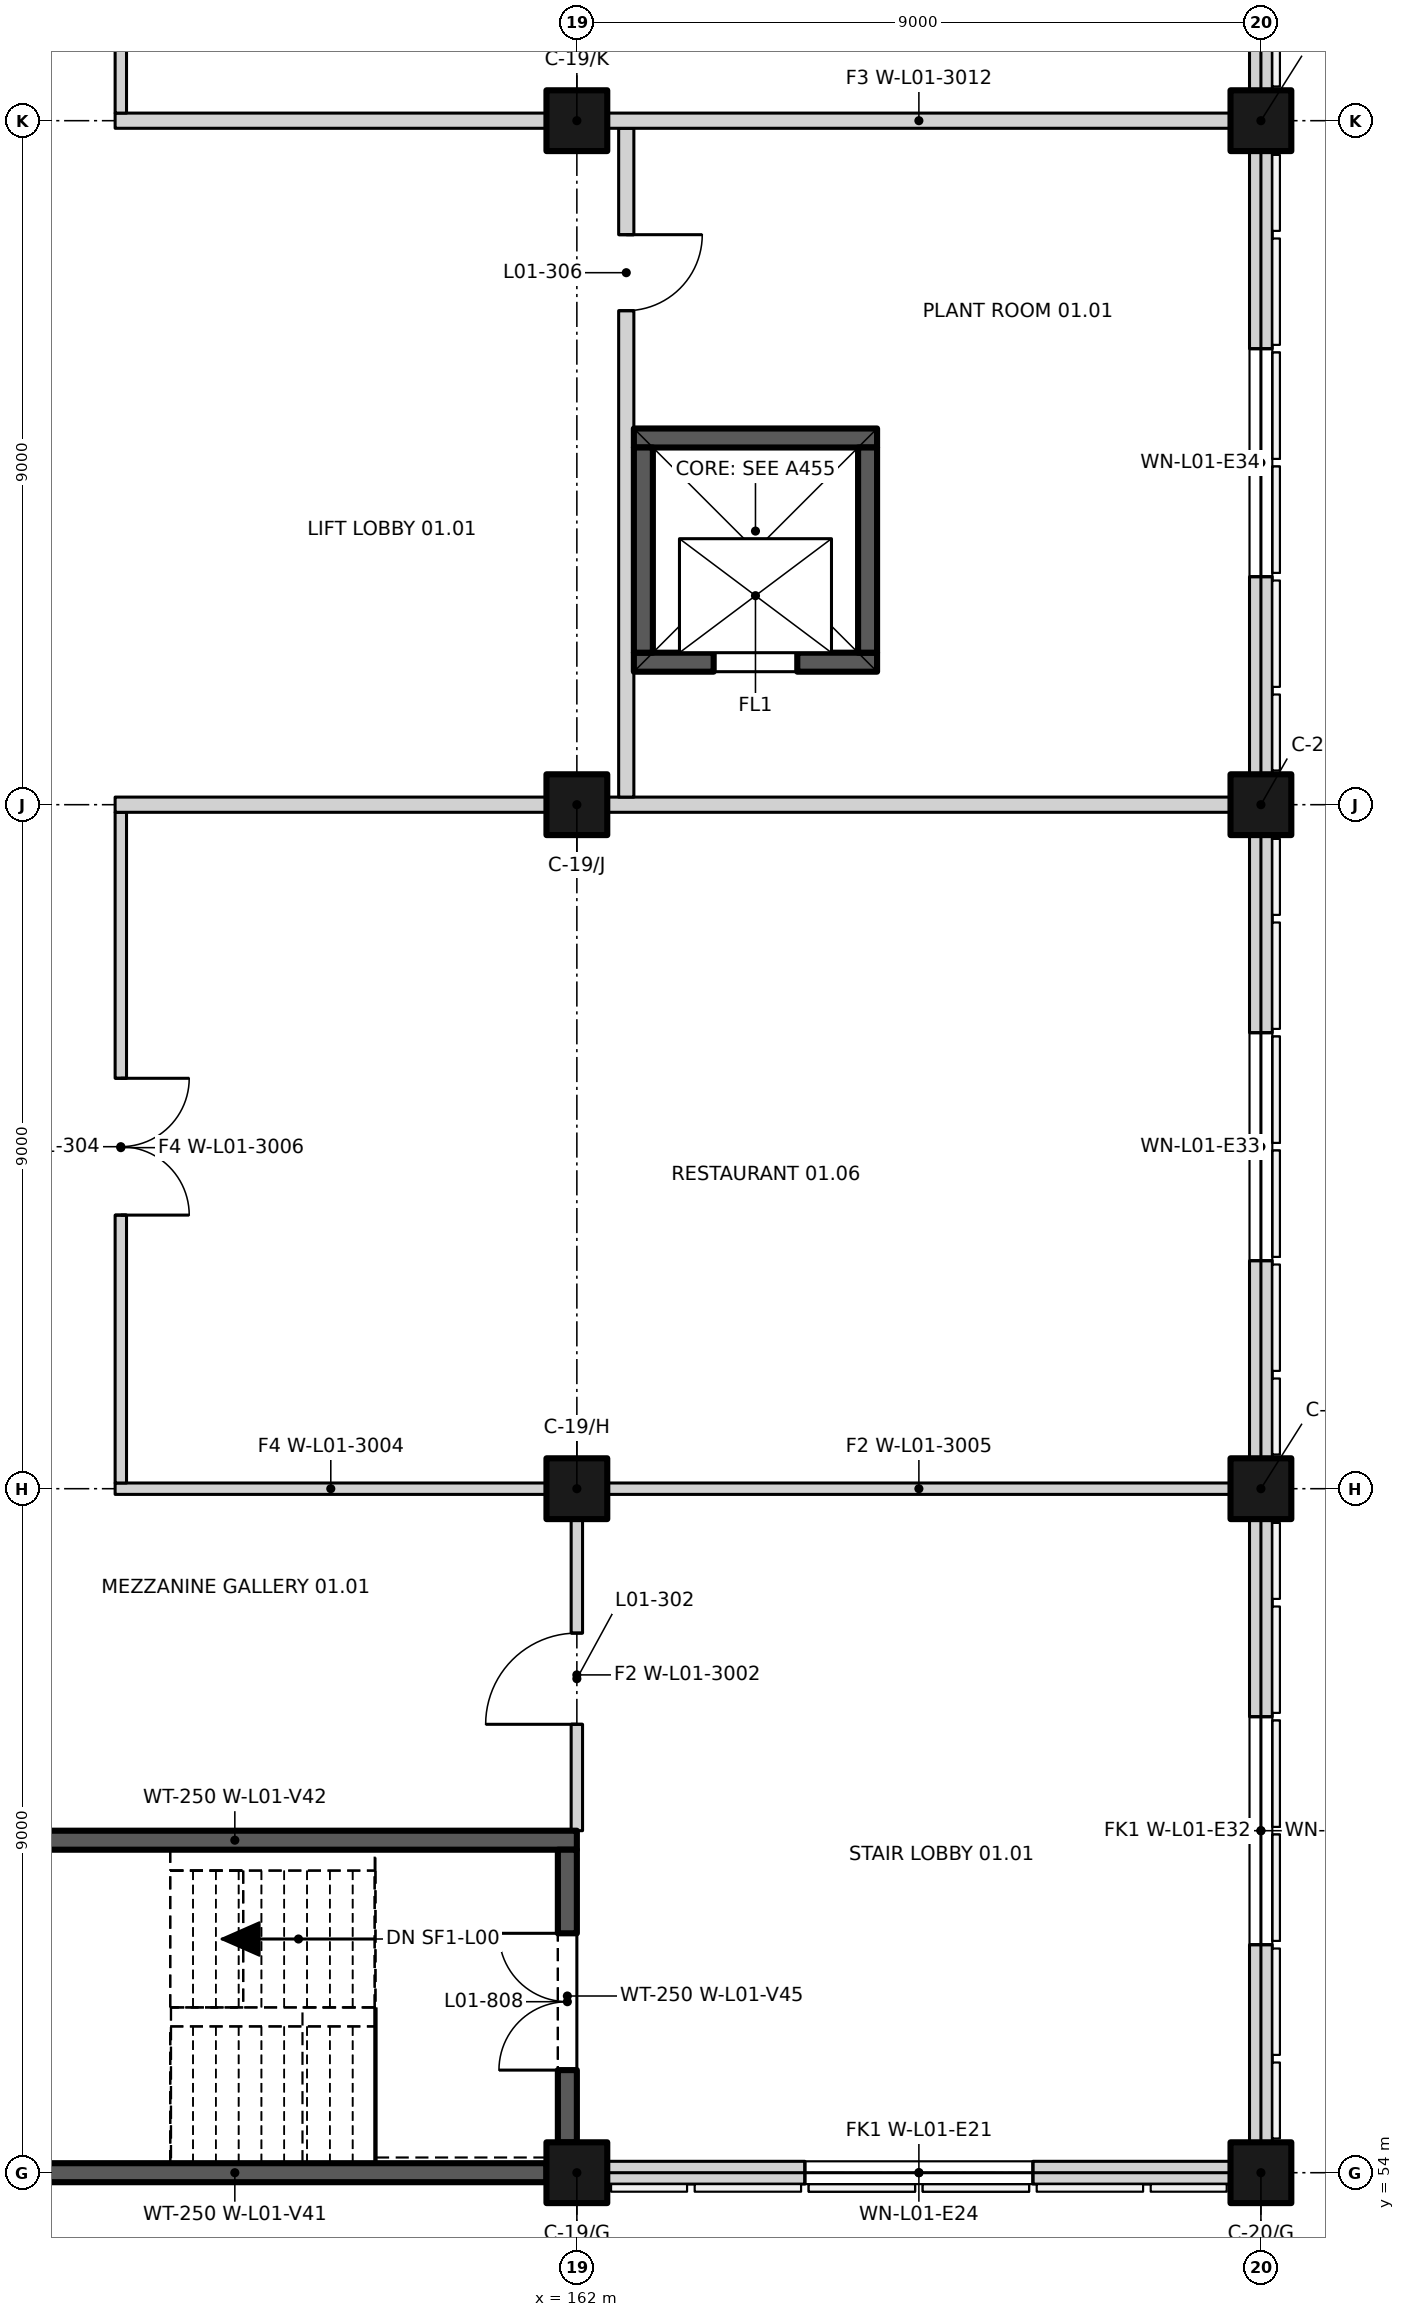
"""IFC4 building model, lengths in metres.
Left out: names, types, materials, properties, quantities, classifications, styles, units other than length and angle.
Written with IfcOpenShell. Run it as: python <this file> out.ifc"""

import sys

from ifc_helpers import new_model, si_unit, direction, frame, frame_2d, origin, origin_2d, place, context, subcontext, project, spatial, rectangle, extrude, element, fill, save


model = new_model("IFC4")
c1 = context("Model", 3, precision=1e-05, world=origin(), true_north=direction((0.0, 1.0)))
c2 = subcontext(c1, "Body", "Model", "MODEL_VIEW")
j1 = project(units=[si_unit("LENGTHUNIT", "METRE"), si_unit("PLANEANGLEUNIT", "RADIAN")], contexts=[c1])
p1 = place(None, origin())
s1 = spatial("IfcSite", under=j1, at=p1, CompositionType="ELEMENT")
p2 = place(p1, origin())
s2 = spatial("IfcBuilding", under=s1, at=p2, CompositionType="ELEMENT")
p3 = place(p2, frame((0.0, 0.0, 6.0)))
s3 = spatial("IfcBuildingStorey", under=s2, at=p3, CompositionType="ELEMENT", Elevation=6.0)
for number, where, z_axis, x_axis in (
    (1, (162.0, 54.0, 0.0), (0.0, 0.0, 1.0), (1.0, 0.0, 0.0)),
    (2, (171.0, 54.0, 0.0), (0.0, 0.0, 1.0), (1.0, 0.0, 0.0)),
    (3, (162.0, 63.0, 0.0), (0.0, 0.0, 1.0), (1.0, 0.0, 0.0)),
    (4, (171.0, 63.0, 0.0), (0.0, 0.0, 1.0), (1.0, 0.0, 0.0)),
    (5, (162.0, 72.0, 0.0), (0.0, 0.0, 1.0), (1.0, 0.0, 0.0)),
    (6, (171.0, 72.0, 0.0), (0.0, 0.0, 1.0), (1.0, 0.0, 0.0)),
    (7, (162.0, 81.0, 0.0), (0.0, 0.0, 1.0), (1.0, 0.0, 0.0)),
    (8, (171.0, 81.0, 0.0), (0.0, 0.0, 1.0), (1.0, 0.0, 0.0)),
):
    element("IfcColumn", number, at=place(p3, frame(where, z_axis=z_axis, x_axis=x_axis)), inside=s3, PredefinedType="COLUMN", context=c2, shape_type="SweptSolid", body=[
        extrude(rectangle(XDim=0.8, YDim=0.8, at=origin_2d()), origin(), (0.0, 0.0, 1.0), 4.5),
    ])
p4 = place(p3, frame((153.4, 54.0, 0.0), z_axis=(0.0, 0.0, 1.0), x_axis=(1.0, 0.0, 0.0)))
e9 = element("IfcWall", 9, at=p4, inside=s3, PredefinedType="SHEAR", context=c2, shape_type="SweptSolid", body=[
    extrude(rectangle(XDim=8.2, YDim=0.25, at=frame_2d((4.1, 0.0))), origin(), (0.0, 0.0, 1.0), 3.65),
])
p5 = place(p3, frame((153.0, 58.375, 0.0), z_axis=(0.0, 0.0, 1.0), x_axis=(1.0, 0.0, 0.0)))
e10 = element("IfcWall", 10, at=p5, inside=s3, PredefinedType="SHEAR", context=c2, shape_type="SweptSolid", body=[
    extrude(rectangle(XDim=9.0, YDim=0.25, at=frame_2d((4.5, 0.0))), origin(), (0.0, 0.0, 1.0), 4.2),
])
p6 = place(p3, frame((161.875, 54.4, 0.0), z_axis=(0.0, 0.0, 1.0), x_axis=(0.0, 1.0, 0.0)))
e11 = element("IfcWall", 11, at=p6, inside=s3, PredefinedType="SHEAR", context=c2, shape_type="SweptSolid", body=[
    extrude(rectangle(XDim=3.85, YDim=0.25, at=frame_2d((1.925, 0.0))), origin(), (0.0, 0.0, 1.0), 4.2),
])
p7 = place(p6, frame((0.95, 0.0, 0.0)))
e12 = element("IfcOpeningElement", 12, at=p7, cuts=e11, PredefinedType="OPENING", context=c2, shape_type="SweptSolid", body=[
    extrude(rectangle(XDim=1.8, YDim=2.1, at=frame_2d((0.9, 1.05))), frame((0.0, 0.135, 0.0), z_axis=(0.0, -1.0, 0.0), x_axis=(1.0, 0.0, 0.0)), (0.0, 0.0, 1.0), 0.27),
])
p8 = place(p3, frame((162.75, 73.875, 0.0), z_axis=(0.0, 0.0, 1.0), x_axis=(1.0, 0.0, 0.0)))
e13 = element("IfcWall", 13, at=p8, inside=s3, PredefinedType="SHEAR", context=c2, shape_type="SweptSolid", body=[
    extrude(rectangle(XDim=3.2, YDim=0.25, at=frame_2d((1.6, 0.0))), origin(), (0.0, 0.0, 1.0), 4.5),
])
p9 = place(p8, frame((1.05, 0.0, 0.0)))
e14 = element("IfcOpeningElement", 14, at=p9, cuts=e13, PredefinedType="OPENING", context=c2, shape_type="SweptSolid", body=[
    extrude(rectangle(XDim=1.1, YDim=2.1, at=frame_2d((0.55, 1.05))), frame((0.0, 0.135, 0.0), z_axis=(0.0, -1.0, 0.0), x_axis=(1.0, 0.0, 0.0)), (0.0, 0.0, 1.0), 0.27),
])
p10 = place(p3, frame((162.75, 76.825, 0.0), z_axis=(0.0, 0.0, 1.0), x_axis=(1.0, 0.0, 0.0)))
e15 = element("IfcWall", 15, at=p10, inside=s3, PredefinedType="SHEAR", context=c2, shape_type="SweptSolid", body=[
    extrude(rectangle(XDim=3.2, YDim=0.25, at=frame_2d((1.6, 0.0))), origin(), (0.0, 0.0, 1.0), 4.5),
])
for number, where, z_axis, x_axis in (
    (16, (162.875, 74.0, 0.0), (0.0, 0.0, 1.0), (0.0, 1.0, 0.0)),
    (17, (165.825, 74.0, 0.0), (0.0, 0.0, 1.0), (0.0, 1.0, 0.0)),
):
    element("IfcWall", number, at=place(p3, frame(where, z_axis=z_axis, x_axis=x_axis)), inside=s3, PredefinedType="SHEAR", context=c2, shape_type="SweptSolid", body=[
        extrude(rectangle(XDim=2.7, YDim=0.25, at=frame_2d((1.35, 0.0))), origin(), (0.0, 0.0, 1.0), 4.5),
    ])
p11 = place(p3, frame((170.6, 54.0, 0.0), z_axis=(0.0, 0.0, 1.0), x_axis=(-1.0, 0.0, 0.0)))
e18 = element("IfcWall", 18, at=p11, inside=s3, PredefinedType="SOLIDWALL", context=c2, shape_type="SweptSolid", body=[
    extrude(rectangle(XDim=8.2, YDim=0.3, at=frame_2d((4.1, 0.0))), origin(), (0.0, 0.0, 1.0), 3.65),
])
p12 = place(p11, frame((2.6, 0.0, 0.9)))
e19 = element("IfcOpeningElement", 19, at=p12, cuts=e18, PredefinedType="OPENING", context=c2, shape_type="SweptSolid", body=[
    extrude(rectangle(XDim=3.0, YDim=2.1, at=frame_2d((1.5, 1.05))), frame((0.0, 0.16, 0.0), z_axis=(0.0, -1.0, 0.0), x_axis=(1.0, 0.0, 0.0)), (0.0, 0.0, 1.0), 0.32),
])
p13 = place(p3, frame((171.0, 62.6, 0.0), z_axis=(0.0, 0.0, 1.0), x_axis=(0.0, -1.0, 0.0)))
e20 = element("IfcWall", 20, at=p13, inside=s3, PredefinedType="SOLIDWALL", context=c2, shape_type="SweptSolid", body=[
    extrude(rectangle(XDim=8.2, YDim=0.3, at=frame_2d((4.1, 0.0))), origin(), (0.0, 0.0, 1.0), 3.65),
])
p14 = place(p13, frame((2.6, 0.0, 0.9)))
e21 = element("IfcOpeningElement", 21, at=p14, cuts=e20, PredefinedType="OPENING", context=c2, shape_type="SweptSolid", body=[
    extrude(rectangle(XDim=3.0, YDim=2.1, at=frame_2d((1.5, 1.05))), frame((0.0, 0.16, 0.0), z_axis=(0.0, -1.0, 0.0), x_axis=(1.0, 0.0, 0.0)), (0.0, 0.0, 1.0), 0.32),
])
p15 = place(p3, frame((171.0, 71.6, 0.0), z_axis=(0.0, 0.0, 1.0), x_axis=(0.0, -1.0, 0.0)))
e22 = element("IfcWall", 22, at=p15, inside=s3, PredefinedType="SOLIDWALL", context=c2, shape_type="SweptSolid", body=[
    extrude(rectangle(XDim=8.2, YDim=0.3, at=frame_2d((4.1, 0.0))), origin(), (0.0, 0.0, 1.0), 3.65),
])
p16 = place(p15, frame((2.6, 0.0, 0.9)))
e23 = element("IfcOpeningElement", 23, at=p16, cuts=e22, PredefinedType="OPENING", context=c2, shape_type="SweptSolid", body=[
    extrude(rectangle(XDim=3.0, YDim=2.1, at=frame_2d((1.5, 1.05))), frame((0.0, 0.16, 0.0), z_axis=(0.0, -1.0, 0.0), x_axis=(1.0, 0.0, 0.0)), (0.0, 0.0, 1.0), 0.32),
])
p17 = place(p3, frame((171.0, 80.6, 0.0), z_axis=(0.0, 0.0, 1.0), x_axis=(0.0, -1.0, 0.0)))
e24 = element("IfcWall", 24, at=p17, inside=s3, PredefinedType="SOLIDWALL", context=c2, shape_type="SweptSolid", body=[
    extrude(rectangle(XDim=8.2, YDim=0.3, at=frame_2d((4.1, 0.0))), origin(), (0.0, 0.0, 1.0), 3.65),
])
p18 = place(p17, frame((2.6, 0.0, 0.9)))
e25 = element("IfcOpeningElement", 25, at=p18, cuts=e24, PredefinedType="OPENING", context=c2, shape_type="SweptSolid", body=[
    extrude(rectangle(XDim=3.0, YDim=2.1, at=frame_2d((1.5, 1.05))), frame((0.0, 0.16, 0.0), z_axis=(0.0, -1.0, 0.0), x_axis=(1.0, 0.0, 0.0)), (0.0, 0.0, 1.0), 0.32),
])
p19 = place(p3, frame((171.0, 89.6, 0.0), z_axis=(0.0, 0.0, 1.0), x_axis=(0.0, -1.0, 0.0)))
e26 = element("IfcWall", 26, at=p19, inside=s3, PredefinedType="SOLIDWALL", context=c2, shape_type="SweptSolid", body=[
    extrude(rectangle(XDim=8.2, YDim=0.3, at=frame_2d((4.1, 0.0))), origin(), (0.0, 0.0, 1.0), 3.65),
])
p20 = place(p19, frame((2.6, 0.0, 0.9)))
e27 = element("IfcOpeningElement", 27, at=p20, cuts=e26, PredefinedType="OPENING", context=c2, shape_type="SweptSolid", body=[
    extrude(rectangle(XDim=3.0, YDim=2.1, at=frame_2d((1.5, 1.05))), frame((0.0, 0.16, 0.0), z_axis=(0.0, -1.0, 0.0), x_axis=(1.0, 0.0, 0.0)), (0.0, 0.0, 1.0), 0.32),
])
p21 = place(p3, frame((162.0, 58.5, 0.0), z_axis=(0.0, 0.0, 1.0), x_axis=(0.0, 1.0, 0.0)))
e28 = element("IfcWall", 28, at=p21, inside=s3, PredefinedType="PARTITIONING", context=c2, shape_type="SweptSolid", body=[
    extrude(rectangle(XDim=4.1, YDim=0.15, at=frame_2d((2.05, 0.0))), origin(), (0.0, 0.0, 1.0), 4.15),
])
p22 = place(p21, frame((1.4, 0.0, 0.0)))
e29 = element("IfcOpeningElement", 29, at=p22, cuts=e28, PredefinedType="OPENING", context=c2, shape_type="SweptSolid", body=[
    extrude(rectangle(XDim=1.2, YDim=2.1, at=frame_2d((0.6, 1.05))), frame((0.0, 0.085, 0.0), z_axis=(0.0, -1.0, 0.0), x_axis=(1.0, 0.0, 0.0)), (0.0, 0.0, 1.0), 0.17),
])
p23 = place(p3, frame((155.925, 63.0, 0.0), z_axis=(0.0, 0.0, 1.0), x_axis=(1.0, 0.0, 0.0)))
e30 = element("IfcWall", 30, at=p23, inside=s3, PredefinedType="PARTITIONING", context=c2, shape_type="SweptSolid", body=[
    extrude(rectangle(XDim=5.675, YDim=0.15, at=frame_2d((2.837, 0.0))), origin(), (0.0, 0.0, 1.0), 4.15),
])
p24 = place(p3, frame((162.4, 63.0, 0.0), z_axis=(0.0, 0.0, 1.0), x_axis=(1.0, 0.0, 0.0)))
e31 = element("IfcWall", 31, at=p24, inside=s3, PredefinedType="PARTITIONING", context=c2, shape_type="SweptSolid", body=[
    extrude(rectangle(XDim=8.2, YDim=0.15, at=frame_2d((4.1, 0.0))), origin(), (0.0, 0.0, 1.0), 4.15),
])
p25 = place(p3, frame((156.0, 63.075, 0.0), z_axis=(0.0, 0.0, 1.0), x_axis=(0.0, 1.0, 0.0)))
e32 = element("IfcWall", 32, at=p25, inside=s3, PredefinedType="PARTITIONING", context=c2, shape_type="SweptSolid", body=[
    extrude(rectangle(XDim=8.825, YDim=0.15, at=frame_2d((4.413, 0.0))), origin(), (0.0, 0.0, 1.0), 4.15),
])
p26 = place(p25, frame((5.325, 0.0, 0.0), z_axis=(0.0, 0.0, 1.0), x_axis=(-1.0, 0.0, 0.0)))
e33 = element("IfcOpeningElement", 33, at=p26, cuts=e32, PredefinedType="OPENING", context=c2, shape_type="SweptSolid", body=[
    extrude(rectangle(XDim=1.8, YDim=2.1, at=frame_2d((0.9, 1.05))), frame((0.0, 0.085, 0.0), z_axis=(0.0, -1.0, 0.0), x_axis=(1.0, 0.0, 0.0)), (0.0, 0.0, 1.0), 0.17),
])
p27 = place(p3, frame((155.925, 72.0, 0.0), z_axis=(0.0, 0.0, 1.0), x_axis=(1.0, 0.0, 0.0)))
e34 = element("IfcWall", 34, at=p27, inside=s3, PredefinedType="PARTITIONING", context=c2, shape_type="SweptSolid", body=[
    extrude(rectangle(XDim=5.675, YDim=0.2, at=frame_2d((2.837, 0.0))), origin(), (0.0, 0.0, 1.0), 4.15),
])
p28 = place(p3, frame((162.4, 72.0, 0.0), z_axis=(0.0, 0.0, 1.0), x_axis=(1.0, 0.0, 0.0)))
e35 = element("IfcWall", 35, at=p28, inside=s3, PredefinedType="PARTITIONING", context=c2, shape_type="SweptSolid", body=[
    extrude(rectangle(XDim=8.2, YDim=0.2, at=frame_2d((4.1, 0.0))), origin(), (0.0, 0.0, 1.0), 3.7),
])
p29 = place(p3, frame((162.65, 72.1, 0.0), z_axis=(0.0, 0.0, 1.0), x_axis=(0.0, 1.0, 0.0)))
e36 = element("IfcWall", 36, at=p29, inside=s3, PredefinedType="PARTITIONING", context=c2, shape_type="SweptSolid", body=[
    extrude(rectangle(XDim=8.8, YDim=0.2, at=frame_2d((4.4, 0.0))), origin(), (0.0, 0.0, 1.0), 3.7),
])
p30 = place(p29, frame((7.4, 0.0, 0.0), z_axis=(0.0, 0.0, 1.0), x_axis=(-1.0, 0.0, 0.0)))
e37 = element("IfcOpeningElement", 37, at=p30, cuts=e36, PredefinedType="OPENING", context=c2, shape_type="SweptSolid", body=[
    extrude(rectangle(XDim=1.0, YDim=2.1, at=frame_2d((0.5, 1.05))), frame((0.0, 0.11, 0.0), z_axis=(0.0, -1.0, 0.0), x_axis=(1.0, 0.0, 0.0)), (0.0, 0.0, 1.0), 0.22),
])
p31 = place(p3, frame((155.925, 81.0, 0.0), z_axis=(0.0, 0.0, 1.0), x_axis=(1.0, 0.0, 0.0)))
e38 = element("IfcWall", 38, at=p31, inside=s3, PredefinedType="PARTITIONING", context=c2, shape_type="SweptSolid", body=[
    extrude(rectangle(XDim=5.675, YDim=0.2, at=frame_2d((2.837, 0.0))), origin(), (0.0, 0.0, 1.0), 4.15),
])
p32 = place(p3, frame((162.4, 81.0, 0.0), z_axis=(0.0, 0.0, 1.0), x_axis=(1.0, 0.0, 0.0)))
e39 = element("IfcWall", 39, at=p32, inside=s3, PredefinedType="PARTITIONING", context=c2, shape_type="SweptSolid", body=[
    extrude(rectangle(XDim=8.2, YDim=0.2, at=frame_2d((4.1, 0.0))), origin(), (0.0, 0.0, 1.0), 3.7),
])
p33 = place(p3, frame((156.0, 81.1, 0.0), z_axis=(0.0, 0.0, 1.0), x_axis=(0.0, 1.0, 0.0)))
e40 = element("IfcWall", 40, at=p33, inside=s3, PredefinedType="PARTITIONING", context=c2, shape_type="SweptSolid", body=[
    extrude(rectangle(XDim=8.825, YDim=0.15, at=frame_2d((4.413, 0.0))), origin(), (0.0, 0.0, 1.0), 4.15),
])
p34 = place(p33, frame((5.3, 0.0, 0.0), z_axis=(0.0, 0.0, 1.0), x_axis=(-1.0, 0.0, 0.0)))
e41 = element("IfcOpeningElement", 41, at=p34, cuts=e40, PredefinedType="OPENING", context=c2, shape_type="SweptSolid", body=[
    extrude(rectangle(XDim=1.8, YDim=2.1, at=frame_2d((0.9, 1.05))), frame((0.0, 0.085, 0.0), z_axis=(0.0, -1.0, 0.0), x_axis=(1.0, 0.0, 0.0)), (0.0, 0.0, 1.0), 0.17),
])
p35 = place(p7, origin())
e42 = element("IfcDoor", 42, at=p35, inside=s3, OperationType="DOUBLE_DOOR_SINGLE_SWING", PredefinedType="DOOR", context=c2, shape_type="SweptSolid", body=[
    extrude(rectangle(XDim=1.8, YDim=2.1, at=frame_2d((0.9, 1.05))), frame((0.0, 0.025, 0.0), z_axis=(0.0, -1.0, 0.0), x_axis=(1.0, 0.0, 0.0)), (0.0, 0.0, 1.0), 0.05),
])
fill(e12, e42)
p36 = place(p9, origin())
e43 = element("IfcDoor", 43, at=p36, inside=s3, OperationType="DOUBLE_DOOR_SLIDING", PredefinedType="DOOR", context=c2, shape_type="SweptSolid", body=[
    extrude(rectangle(XDim=1.1, YDim=2.1, at=frame_2d((0.55, 1.05))), frame((0.0, 0.025, 0.0), z_axis=(0.0, -1.0, 0.0), x_axis=(1.0, 0.0, 0.0)), (0.0, 0.0, 1.0), 0.05),
])
fill(e14, e43)
p37 = place(p12, origin())
e44 = element("IfcWindow", 44, at=p37, inside=s3, PartitioningType="SINGLE_PANEL", PredefinedType="WINDOW", context=c2, shape_type="SweptSolid", body=[
    extrude(rectangle(XDim=3.0, YDim=2.1, at=frame_2d((1.5, 1.05))), frame((0.0, -0.03, 0.0), z_axis=(0.0, -1.0, 0.0), x_axis=(1.0, 0.0, 0.0)), (0.0, 0.0, 1.0), 0.06),
])
fill(e19, e44)
p38 = place(p14, origin())
e45 = element("IfcWindow", 45, at=p38, inside=s3, PartitioningType="SINGLE_PANEL", PredefinedType="WINDOW", context=c2, shape_type="SweptSolid", body=[
    extrude(rectangle(XDim=3.0, YDim=2.1, at=frame_2d((1.5, 1.05))), frame((0.0, -0.03, 0.0), z_axis=(0.0, -1.0, 0.0), x_axis=(1.0, 0.0, 0.0)), (0.0, 0.0, 1.0), 0.06),
])
fill(e21, e45)
p39 = place(p16, origin())
e46 = element("IfcWindow", 46, at=p39, inside=s3, PartitioningType="SINGLE_PANEL", PredefinedType="WINDOW", context=c2, shape_type="SweptSolid", body=[
    extrude(rectangle(XDim=3.0, YDim=2.1, at=frame_2d((1.5, 1.05))), frame((0.0, -0.03, 0.0), z_axis=(0.0, -1.0, 0.0), x_axis=(1.0, 0.0, 0.0)), (0.0, 0.0, 1.0), 0.06),
])
fill(e23, e46)
p40 = place(p18, origin())
e47 = element("IfcWindow", 47, at=p40, inside=s3, PartitioningType="SINGLE_PANEL", PredefinedType="WINDOW", context=c2, shape_type="SweptSolid", body=[
    extrude(rectangle(XDim=3.0, YDim=2.1, at=frame_2d((1.5, 1.05))), frame((0.0, -0.03, 0.0), z_axis=(0.0, -1.0, 0.0), x_axis=(1.0, 0.0, 0.0)), (0.0, 0.0, 1.0), 0.06),
])
fill(e25, e47)
p41 = place(p22, origin())
e48 = element("IfcDoor", 48, at=p41, inside=s3, OperationType="SINGLE_SWING_LEFT", PredefinedType="DOOR", context=c2, shape_type="SweptSolid", body=[
    extrude(rectangle(XDim=1.2, YDim=2.1, at=frame_2d((0.6, 1.05))), frame((0.0, 0.025, 0.0), z_axis=(0.0, -1.0, 0.0), x_axis=(1.0, 0.0, 0.0)), (0.0, 0.0, 1.0), 0.05),
])
fill(e29, e48)
p42 = place(p26, origin())
e49 = element("IfcDoor", 49, at=p42, inside=s3, OperationType="DOUBLE_DOOR_SINGLE_SWING", PredefinedType="DOOR", context=c2, shape_type="SweptSolid", body=[
    extrude(rectangle(XDim=1.8, YDim=2.1, at=frame_2d((0.9, 1.05))), frame((0.0, 0.025, 0.0), z_axis=(0.0, -1.0, 0.0), x_axis=(1.0, 0.0, 0.0)), (0.0, 0.0, 1.0), 0.05),
])
fill(e33, e49)
p43 = place(p30, origin())
e50 = element("IfcDoor", 50, at=p43, inside=s3, OperationType="SINGLE_SWING_LEFT", PredefinedType="DOOR", context=c2, shape_type="SweptSolid", body=[
    extrude(rectangle(XDim=1.0, YDim=2.1, at=frame_2d((0.5, 1.05))), frame((0.0, 0.025, 0.0), z_axis=(0.0, -1.0, 0.0), x_axis=(1.0, 0.0, 0.0)), (0.0, 0.0, 1.0), 0.05),
])
fill(e37, e50)
save(model, sys.argv[1])
